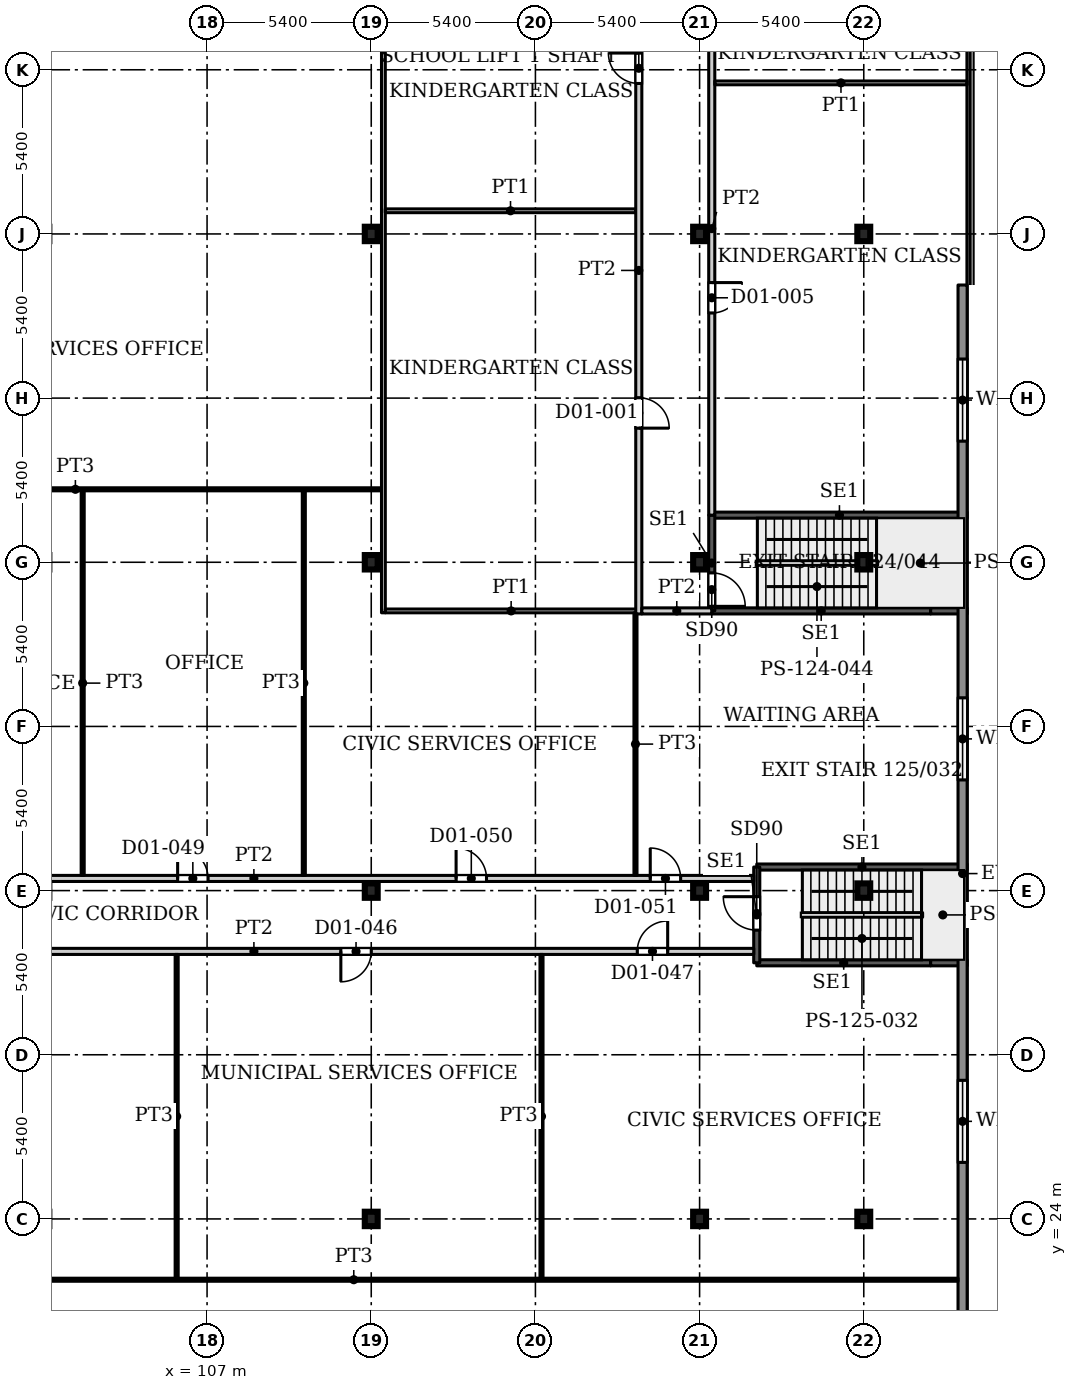
"""IFC4 building model, lengths in metres.
Left out: names, types, materials, properties, quantities, classifications, styles, units other than length and angle.
Written with IfcOpenShell. Run it as: python <this file> out.ifc"""

import sys

from ifc_helpers import new_model, si_unit, direction, frame, frame_2d, origin, origin_2d, place, context, subcontext, project, spatial, rectangle, i_section, extrude, source, transform, mapped, element, fill, save


model = new_model("IFC4")
c1 = context("Model", 3, precision=1e-05, world=origin(), true_north=direction((0.0, 1.0)))
c2 = subcontext(c1, "Body", "Model", "MODEL_VIEW")
j1 = project(units=[si_unit("LENGTHUNIT", "METRE"), si_unit("PLANEANGLEUNIT", "RADIAN")], contexts=[c1])
p1 = place(None, origin())
s1 = spatial("IfcSite", under=j1, at=p1, CompositionType="ELEMENT")
p2 = place(p1, origin())
s2 = spatial("IfcBuilding", under=s1, at=p2, CompositionType="ELEMENT")
p3 = place(p2, frame((0.0, 0.0, 7.5)))
s3 = spatial("IfcBuildingStorey", under=s2, at=p3, CompositionType="ELEMENT", Elevation=7.5)
for number, where, z_axis, x_axis in (
    (1, (112.4, 24.0, 0.0), (0.0, 0.0, 1.0), (1.0, 0.0, 0.0)),
    (2, (123.2, 24.0, 0.0), (0.0, 0.0, 1.0), (1.0, 0.0, 0.0)),
    (3, (128.6, 24.0, 0.0), (0.0, 0.0, 1.0), (1.0, 0.0, 0.0)),
    (4, (112.4, 34.8, 0.0), (0.0, 0.0, 1.0), (1.0, 0.0, 0.0)),
    (5, (123.2, 34.8, 0.0), (0.0, 0.0, 1.0), (1.0, 0.0, 0.0)),
    (6, (128.6, 34.8, 0.0), (0.0, 0.0, 1.0), (1.0, 0.0, 0.0)),
    (7, (112.4, 45.6, 0.0), (0.0, 0.0, 1.0), (1.0, 0.0, 0.0)),
    (8, (123.2, 45.6, 0.0), (0.0, 0.0, 1.0), (1.0, 0.0, 0.0)),
    (9, (128.6, 45.6, 0.0), (0.0, 0.0, 1.0), (1.0, 0.0, 0.0)),
    (10, (112.4, 56.4, 0.0), (0.0, 0.0, 1.0), (1.0, 0.0, 0.0)),
    (11, (123.2, 56.4, 0.0), (0.0, 0.0, 1.0), (1.0, 0.0, 0.0)),
    (12, (128.6, 56.4, 0.0), (0.0, 0.0, 1.0), (1.0, 0.0, 0.0)),
):
    element("IfcColumn", number, at=place(p3, frame(where, z_axis=z_axis, x_axis=x_axis)), inside=s3, PredefinedType="COLUMN", context=c2, shape_type="SweptSolid", body=[
        extrude(i_section(OverallWidth=0.424, OverallDepth=0.474, WebThickness=0.048, FlangeThickness=0.077, FilletRadius=0.014, at=origin_2d()), origin(), (0.0, 0.0, 1.0), 5.0),
    ])
p4 = place(p3, frame((131.85, 54.72, 0.0), z_axis=(0.0, 0.0, 1.0), x_axis=(0.0, -1.0, 0.0)))
e13 = element("IfcWall", 13, at=p4, inside=s3, PredefinedType="SOLIDWALL", context=c2, shape_type="SweptSolid", body=[
    extrude(rectangle(XDim=38.72, YDim=0.3, at=frame_2d((19.36, 0.0))), origin(), (0.0, 0.0, 1.0), 4.75),
])
p5 = place(p4, frame((2.435, 0.0, 0.6)))
e14 = element("IfcOpeningElement", 14, at=p5, cuts=e13, PredefinedType="OPENING", context=c2, shape_type="SweptSolid", body=[
    extrude(rectangle(XDim=2.7, YDim=3.0, at=frame_2d((1.35, 1.5))), frame((0.0, 0.16, 0.0), z_axis=(0.0, -1.0, 0.0), x_axis=(1.0, 0.0, 0.0)), (0.0, 0.0, 1.0), 0.32),
])
p6 = place(p4, frame((13.58, 0.0, 0.6)))
e15 = element("IfcOpeningElement", 15, at=p6, cuts=e13, PredefinedType="OPENING", context=c2, shape_type="SweptSolid", body=[
    extrude(rectangle(XDim=2.7, YDim=3.0, at=frame_2d((1.35, 1.5))), frame((0.0, 0.16, 0.0), z_axis=(0.0, -1.0, 0.0), x_axis=(1.0, 0.0, 0.0)), (0.0, 0.0, 1.0), 0.32),
])
p7 = place(p4, frame((26.16, 0.0, 0.6)))
e16 = element("IfcOpeningElement", 16, at=p7, cuts=e13, PredefinedType="OPENING", context=c2, shape_type="SweptSolid", body=[
    extrude(rectangle(XDim=2.7, YDim=3.0, at=frame_2d((1.35, 1.5))), frame((0.0, 0.16, 0.0), z_axis=(0.0, -1.0, 0.0), x_axis=(1.0, 0.0, 0.0)), (0.0, 0.0, 1.0), 0.32),
])
p8 = place(p3, frame((123.6, 44.0, 0.0), z_axis=(0.0, 0.0, 1.0), x_axis=(1.0, 0.0, 0.0)))
e17 = element("IfcWall", 17, at=p8, inside=s3, PredefinedType="SHEAR", context=c2, shape_type="SweptSolid", body=[
    extrude(rectangle(XDim=7.2, YDim=0.2, at=frame_2d((3.6, 0.0))), origin(), (0.0, 0.0, 1.0), 5.0),
])
p9 = place(p3, frame((130.8, 44.0, 0.0), z_axis=(0.0, 0.0, 1.0), x_axis=(1.0, 0.0, 0.0)))
e18 = element("IfcWall", 18, at=p9, inside=s3, PredefinedType="SHEAR", context=c2, shape_type="SweptSolid", body=[
    extrude(rectangle(XDim=1.2, YDim=0.2, at=frame_2d((0.6, 0.0))), origin(), (0.0, 0.0, 1.0), 5.0),
])
p10 = place(p3, frame((123.6, 47.15, 0.0), z_axis=(0.0, 0.0, 1.0), x_axis=(1.0, 0.0, 0.0)))
e19 = element("IfcWall", 19, at=p10, inside=s3, PredefinedType="SHEAR", context=c2, shape_type="SweptSolid", body=[
    extrude(rectangle(XDim=8.4, YDim=0.2, at=frame_2d((4.2, 0.0))), origin(), (0.0, 0.0, 1.0), 5.0),
])
p11 = place(p3, frame((123.6, 44.0, 0.0), z_axis=(0.0, 0.0, 1.0), x_axis=(0.0, 1.0, 0.0)))
e20 = element("IfcWall", 20, at=p11, inside=s3, PredefinedType="SHEAR", context=c2, shape_type="SweptSolid", body=[
    extrude(rectangle(XDim=3.15, YDim=0.2, at=frame_2d((1.575, 0.0))), origin(), (0.0, 0.0, 1.0), 5.0),
])
p12 = place(p11, frame((0.15, 0.0, 0.0)))
e21 = element("IfcOpeningElement", 21, at=p12, cuts=e20, PredefinedType="OPENING", context=c2, shape_type="SweptSolid", body=[
    extrude(rectangle(XDim=1.1, YDim=2.2, at=frame_2d((0.55, 1.1))), frame((0.0, 0.11, 0.0), z_axis=(0.0, -1.0, 0.0), x_axis=(1.0, 0.0, 0.0)), (0.0, 0.0, 1.0), 0.22),
])
p13 = place(p3, frame((125.08, 32.425, 0.0), z_axis=(0.0, 0.0, 1.0), x_axis=(1.0, 0.0, 0.0)))
e22 = element("IfcWall", 22, at=p13, inside=s3, PredefinedType="SHEAR", context=c2, shape_type="SweptSolid", body=[
    extrude(rectangle(XDim=5.72, YDim=0.2, at=frame_2d((2.86, 0.0))), origin(), (0.0, 0.0, 1.0), 5.0),
])
p14 = place(p3, frame((130.8, 32.425, 0.0), z_axis=(0.0, 0.0, 1.0), x_axis=(1.0, 0.0, 0.0)))
e23 = element("IfcWall", 23, at=p14, inside=s3, PredefinedType="SHEAR", context=c2, shape_type="SweptSolid", body=[
    extrude(rectangle(XDim=1.2, YDim=0.2, at=frame_2d((0.6, 0.0))), origin(), (0.0, 0.0, 1.0), 5.0),
])
p15 = place(p3, frame((125.08, 35.575, 0.0), z_axis=(0.0, 0.0, 1.0), x_axis=(1.0, 0.0, 0.0)))
e24 = element("IfcWall", 24, at=p15, inside=s3, PredefinedType="SHEAR", context=c2, shape_type="SweptSolid", body=[
    extrude(rectangle(XDim=6.92, YDim=0.2, at=frame_2d((3.46, 0.0))), origin(), (0.0, 0.0, 1.0), 5.0),
])
p16 = place(p3, frame((125.08, 32.425, 0.0), z_axis=(0.0, 0.0, 1.0), x_axis=(0.0, 1.0, 0.0)))
e25 = element("IfcWall", 25, at=p16, inside=s3, PredefinedType="SHEAR", context=c2, shape_type="SweptSolid", body=[
    extrude(rectangle(XDim=3.15, YDim=0.2, at=frame_2d((1.575, 0.0))), origin(), (0.0, 0.0, 1.0), 5.0),
])
p17 = place(p16, frame((1.075, 0.0, 0.0)))
e26 = element("IfcOpeningElement", 26, at=p17, cuts=e25, PredefinedType="OPENING", context=c2, shape_type="SweptSolid", body=[
    extrude(rectangle(XDim=1.1, YDim=2.2, at=frame_2d((0.55, 1.1))), frame((0.0, 0.11, 0.0), z_axis=(0.0, -1.0, 0.0), x_axis=(1.0, 0.0, 0.0)), (0.0, 0.0, 1.0), 0.22),
])
p18 = place(p3, frame((91.95, 22.0, 0.0), z_axis=(0.0, 0.0, 1.0), x_axis=(1.0, 0.0, 0.0)))
e27 = element("IfcWall", 27, at=p18, inside=s3, PredefinedType="PARTITIONING", context=c2, shape_type="SweptSolid", body=[
    extrude(rectangle(XDim=39.751, YDim=0.1, at=frame_2d((19.875, 0.0))), origin(), (0.0, 0.0, 1.0), 4.68),
])
p19 = place(p3, frame((92.1, 32.8, 0.0), z_axis=(0.0, 0.0, 1.0), x_axis=(1.0, 0.0, 0.0)))
e28 = element("IfcWall", 28, at=p19, inside=s3, PredefinedType="PARTITIONING", context=c2, shape_type="SweptSolid", body=[
    extrude(rectangle(XDim=32.881, YDim=0.2, at=frame_2d((16.44, 0.0))), origin(), (0.0, 0.0, 1.0), 4.68),
])
p20 = place(p19, frame((6.3, 0.0, 0.0)))
e29 = element("IfcOpeningElement", 29, at=p20, cuts=e28, PredefinedType="OPENING", context=c2, shape_type="SweptSolid", body=[
    extrude(rectangle(XDim=1.0, YDim=2.1, at=frame_2d((0.5, 1.05))), frame((0.0, 0.11, 0.0), z_axis=(0.0, -1.0, 0.0), x_axis=(1.0, 0.0, 0.0)), (0.0, 0.0, 1.0), 0.22),
])
p21 = place(p19, frame((19.3, 0.0, 0.0)))
e30 = element("IfcOpeningElement", 30, at=p21, cuts=e28, PredefinedType="OPENING", context=c2, shape_type="SweptSolid", body=[
    extrude(rectangle(XDim=1.0, YDim=2.1, at=frame_2d((0.5, 1.05))), frame((0.0, 0.11, 0.0), z_axis=(0.0, -1.0, 0.0), x_axis=(1.0, 0.0, 0.0)), (0.0, 0.0, 1.0), 0.22),
])
p22 = place(p19, frame((29.05, 0.0, 0.0)))
e31 = element("IfcOpeningElement", 31, at=p22, cuts=e28, PredefinedType="OPENING", context=c2, shape_type="SweptSolid", body=[
    extrude(rectangle(XDim=1.0, YDim=2.1, at=frame_2d((0.5, 1.05))), frame((0.0, 0.11, 0.0), z_axis=(0.0, -1.0, 0.0), x_axis=(1.0, 0.0, 0.0)), (0.0, 0.0, 1.0), 0.22),
])
p23 = place(p3, frame((92.1, 35.2, 0.0), z_axis=(0.0, 0.0, 1.0), x_axis=(1.0, 0.0, 0.0)))
e32 = element("IfcWall", 32, at=p23, inside=s3, PredefinedType="PARTITIONING", context=c2, shape_type="SweptSolid", body=[
    extrude(rectangle(XDim=32.88, YDim=0.2, at=frame_2d((16.44, 0.0))), origin(), (0.0, 0.0, 1.0), 4.68),
])
p24 = place(p23, frame((4.909, 0.0, 0.0)))
e33 = element("IfcOpeningElement", 33, at=p24, cuts=e32, PredefinedType="OPENING", context=c2, shape_type="SweptSolid", body=[
    extrude(rectangle(XDim=1.0, YDim=2.1, at=frame_2d((0.5, 1.05))), frame((0.0, 0.11, 0.0), z_axis=(0.0, -1.0, 0.0), x_axis=(1.0, 0.0, 0.0)), (0.0, 0.0, 1.0), 0.22),
])
p25 = place(p23, frame((13.932, 0.0, 0.0)))
e34 = element("IfcOpeningElement", 34, at=p25, cuts=e32, PredefinedType="OPENING", context=c2, shape_type="SweptSolid", body=[
    extrude(rectangle(XDim=1.0, YDim=2.1, at=frame_2d((0.5, 1.05))), frame((0.0, 0.11, 0.0), z_axis=(0.0, -1.0, 0.0), x_axis=(1.0, 0.0, 0.0)), (0.0, 0.0, 1.0), 0.22),
])
p26 = place(p23, frame((23.091, 0.0, 0.0)))
e35 = element("IfcOpeningElement", 35, at=p26, cuts=e32, PredefinedType="OPENING", context=c2, shape_type="SweptSolid", body=[
    extrude(rectangle(XDim=1.0, YDim=2.1, at=frame_2d((0.5, 1.05))), frame((0.0, 0.11, 0.0), z_axis=(0.0, -1.0, 0.0), x_axis=(1.0, 0.0, 0.0)), (0.0, 0.0, 1.0), 0.22),
])
p27 = place(p23, frame((29.477, 0.0, 0.0)))
e36 = element("IfcOpeningElement", 36, at=p27, cuts=e32, PredefinedType="OPENING", context=c2, shape_type="SweptSolid", body=[
    extrude(rectangle(XDim=1.0, YDim=2.1, at=frame_2d((0.5, 1.05))), frame((0.0, 0.11, 0.0), z_axis=(0.0, -1.0, 0.0), x_axis=(1.0, 0.0, 0.0)), (0.0, 0.0, 1.0), 0.22),
])
p28 = place(p3, frame((92.6, 48.0, 0.0), z_axis=(0.0, 0.0, 1.0), x_axis=(1.0, 0.0, 0.0)))
e37 = element("IfcWall", 37, at=p28, inside=s3, PredefinedType="PARTITIONING", context=c2, shape_type="SweptSolid", body=[
    extrude(rectangle(XDim=20.138, YDim=0.1, at=frame_2d((10.069, 0.0))), origin(), (0.0, 0.0, 1.0), 4.68),
])
p29 = place(p3, frame((102.909, 35.3, 0.0), z_axis=(0.0, 0.0, 1.0), x_axis=(0.0, 1.0, 0.0)))
e38 = element("IfcWall", 38, at=p29, inside=s3, PredefinedType="PARTITIONING", context=c2, shape_type="SweptSolid", body=[
    extrude(rectangle(XDim=12.65, YDim=0.1, at=frame_2d((6.325, 0.0))), origin(), (0.0, 0.0, 1.0), 4.68),
])
p30 = place(p3, frame((106.0, 22.05, 0.0), z_axis=(0.0, 0.0, 1.0), x_axis=(0.0, 1.0, 0.0)))
e39 = element("IfcWall", 39, at=p30, inside=s3, PredefinedType="PARTITIONING", context=c2, shape_type="SweptSolid", body=[
    extrude(rectangle(XDim=10.65, YDim=0.1, at=frame_2d((5.325, 0.0))), origin(), (0.0, 0.0, 1.0), 4.68),
])
p31 = place(p3, frame((110.182, 35.3, 0.0), z_axis=(0.0, 0.0, 1.0), x_axis=(0.0, 1.0, 0.0)))
e40 = element("IfcWall", 40, at=p31, inside=s3, PredefinedType="PARTITIONING", context=c2, shape_type="SweptSolid", body=[
    extrude(rectangle(XDim=12.65, YDim=0.1, at=frame_2d((6.325, 0.0))), origin(), (0.0, 0.0, 1.0), 4.68),
])
p32 = place(p3, frame((112.8, 43.938, 0.0), z_axis=(0.0, 0.0, 1.0), x_axis=(0.0, 1.0, 0.0)))
e41 = element("IfcWall", 41, at=p32, inside=s3, PredefinedType="PARTITIONING", context=c2, shape_type="SweptSolid", body=[
    extrude(rectangle(XDim=46.787, YDim=0.125, at=frame_2d((23.394, 0.0))), origin(), (0.0, 0.0, 1.0), 4.68),
])
p33 = place(p3, frame((112.862, 44.0, 0.0), z_axis=(0.0, 0.0, 1.0), x_axis=(1.0, 0.0, 0.0)))
e42 = element("IfcWall", 42, at=p33, inside=s3, PredefinedType="PARTITIONING", context=c2, shape_type="SweptSolid", body=[
    extrude(rectangle(XDim=8.279, YDim=0.125, at=frame_2d((4.14, 0.0))), origin(), (0.0, 0.0, 1.0), 4.68),
])
p34 = place(p3, frame((112.862, 57.162, 0.0), z_axis=(0.0, 0.0, 1.0), x_axis=(1.0, 0.0, 0.0)))
e43 = element("IfcWall", 43, at=p34, inside=s3, PredefinedType="PARTITIONING", context=c2, shape_type="SweptSolid", body=[
    extrude(rectangle(XDim=8.238, YDim=0.125, at=frame_2d((4.119, 0.0))), origin(), (0.0, 0.0, 1.0), 4.68),
])
p35 = place(p3, frame((118.0, 22.05, 0.0), z_axis=(0.0, 0.0, 1.0), x_axis=(0.0, 1.0, 0.0)))
e44 = element("IfcWall", 44, at=p35, inside=s3, PredefinedType="PARTITIONING", context=c2, shape_type="SweptSolid", body=[
    extrude(rectangle(XDim=10.65, YDim=0.1, at=frame_2d((5.325, 0.0))), origin(), (0.0, 0.0, 1.0), 4.68),
])
p36 = place(p3, frame((121.091, 35.3, 0.0), z_axis=(0.0, 0.0, 1.0), x_axis=(0.0, 1.0, 0.0)))
e45 = element("IfcWall", 45, at=p36, inside=s3, PredefinedType="PARTITIONING", context=c2, shape_type="SweptSolid", body=[
    extrude(rectangle(XDim=8.638, YDim=0.1, at=frame_2d((4.319, 0.0))), origin(), (0.0, 0.0, 1.0), 4.68),
])
p37 = place(p3, frame((121.2, 43.9, 0.0), z_axis=(0.0, 0.0, 1.0), x_axis=(0.0, 1.0, 0.0)))
e46 = element("IfcWall", 46, at=p37, inside=s3, PredefinedType="PARTITIONING", context=c2, shape_type="SweptSolid", body=[
    extrude(rectangle(XDim=22.6, YDim=0.2, at=frame_2d((11.3, 0.0))), origin(), (0.0, 0.0, 1.0), 4.68),
])
p38 = place(p37, frame((6.112, 0.0, 0.0)))
e47 = element("IfcOpeningElement", 47, at=p38, cuts=e46, PredefinedType="OPENING", context=c2, shape_type="SweptSolid", body=[
    extrude(rectangle(XDim=1.0, YDim=2.1, at=frame_2d((0.5, 1.05))), frame((0.0, 0.11, 0.0), z_axis=(0.0, -1.0, 0.0), x_axis=(1.0, 0.0, 0.0)), (0.0, 0.0, 1.0), 0.22),
])
p39 = place(p37, frame((17.45, 0.0, 0.0)))
e48 = element("IfcOpeningElement", 48, at=p39, cuts=e46, PredefinedType="OPENING", context=c2, shape_type="SweptSolid", body=[
    extrude(rectangle(XDim=1.0, YDim=2.1, at=frame_2d((0.5, 1.05))), frame((0.0, 0.11, 0.0), z_axis=(0.0, -1.0, 0.0), x_axis=(1.0, 0.0, 0.0)), (0.0, 0.0, 1.0), 0.22),
])
p40 = place(p3, frame((121.3, 44.0, 0.0), z_axis=(0.0, 0.0, 1.0), x_axis=(1.0, 0.0, 0.0)))
e49 = element("IfcWall", 49, at=p40, inside=s3, PredefinedType="PARTITIONING", context=c2, shape_type="SweptSolid", body=[
    extrude(rectangle(XDim=2.3, YDim=0.2, at=frame_2d((1.15, 0.0))), origin(), (0.0, 0.0, 1.0), 4.68),
])
p41 = place(p3, frame((123.6, 47.15, 0.0), z_axis=(0.0, 0.0, 1.0), x_axis=(0.0, 1.0, 0.0)))
e50 = element("IfcWall", 50, at=p41, inside=s3, PredefinedType="PARTITIONING", context=c2, shape_type="SweptSolid", body=[
    extrude(rectangle(XDim=18.85, YDim=0.2, at=frame_2d((9.425, 0.0))), origin(), (0.0, 0.0, 1.0), 4.68),
])
p42 = place(p41, frame((6.65, 0.0, 0.0)))
e51 = element("IfcOpeningElement", 51, at=p42, cuts=e50, PredefinedType="OPENING", context=c2, shape_type="SweptSolid", body=[
    extrude(rectangle(XDim=1.0, YDim=2.1, at=frame_2d((0.5, 1.05))), frame((0.0, 0.11, 0.0), z_axis=(0.0, -1.0, 0.0), x_axis=(1.0, 0.0, 0.0)), (0.0, 0.0, 1.0), 0.22),
])
p43 = place(p41, frame((16.119, 0.0, 0.0)))
e52 = element("IfcOpeningElement", 52, at=p43, cuts=e50, PredefinedType="OPENING", context=c2, shape_type="SweptSolid", body=[
    extrude(rectangle(XDim=1.0, YDim=2.1, at=frame_2d((0.5, 1.05))), frame((0.0, 0.11, 0.0), z_axis=(0.0, -1.0, 0.0), x_axis=(1.0, 0.0, 0.0)), (0.0, 0.0, 1.0), 0.22),
])
p44 = place(p3, frame((123.7, 61.369, 0.0), z_axis=(0.0, 0.0, 1.0), x_axis=(1.0, 0.0, 0.0)))
e53 = element("IfcWall", 53, at=p44, inside=s3, PredefinedType="PARTITIONING", context=c2, shape_type="SweptSolid", body=[
    extrude(rectangle(XDim=8.3, YDim=0.125, at=frame_2d((4.15, 0.0))), origin(), (0.0, 0.0, 1.0), 4.68),
])
m1 = source(origin(), c2, "Body", "SweptSolid", [
    extrude(rectangle(XDim=2.7, YDim=3.0, at=frame_2d((1.35, 1.5))), frame((0.0, 0.03, 0.0), z_axis=(0.0, -1.0, 0.0), x_axis=(1.0, 0.0, 0.0)), (0.0, 0.0, 1.0), 0.06),
])
p45 = place(p5, origin())
e54 = element("IfcWindow", 54, at=p45, inside=s3, PartitioningType="SINGLE_PANEL", PredefinedType="WINDOW", context=c2, shape_type="MappedRepresentation", body=[
    mapped(m1, transform((0.0, 0.0, 0.0), x_axis=(1.0, 0.0, 0.0), y_axis=(0.0, 1.0, 0.0), z_axis=(0.0, 0.0, 1.0), scale=1.0)),
])
fill(e14, e54)
p46 = place(p6, origin())
e55 = element("IfcWindow", 55, at=p46, inside=s3, PartitioningType="SINGLE_PANEL", PredefinedType="WINDOW", context=c2, shape_type="MappedRepresentation", body=[
    mapped(m1, transform((0.0, 0.0, 0.0), x_axis=(1.0, 0.0, 0.0), y_axis=(0.0, 1.0, 0.0), z_axis=(0.0, 0.0, 1.0), scale=1.0)),
])
fill(e15, e55)
p47 = place(p7, origin())
e56 = element("IfcWindow", 56, at=p47, inside=s3, PartitioningType="SINGLE_PANEL", PredefinedType="WINDOW", context=c2, shape_type="MappedRepresentation", body=[
    mapped(m1, transform((0.0, 0.0, 0.0), x_axis=(1.0, 0.0, 0.0), y_axis=(0.0, 1.0, 0.0), z_axis=(0.0, 0.0, 1.0), scale=1.0)),
])
fill(e16, e56)
m2 = source(origin(), c2, "Body", "SweptSolid", [
    extrude(rectangle(XDim=1.1, YDim=2.2, at=frame_2d((0.55, 1.1))), frame((0.0, 0.025, 0.0), z_axis=(0.0, -1.0, 0.0), x_axis=(1.0, 0.0, 0.0)), (0.0, 0.0, 1.0), 0.05),
])
p48 = place(p12, origin())
e57 = element("IfcDoor", 57, at=p48, inside=s3, OperationType="SINGLE_SWING_RIGHT", PredefinedType="DOOR", context=c2, shape_type="MappedRepresentation", body=[
    mapped(m2, transform((0.0, 0.0, 0.0), x_axis=(1.0, 0.0, 0.0), y_axis=(0.0, 1.0, 0.0), z_axis=(0.0, 0.0, 1.0), scale=1.0)),
])
fill(e21, e57)
p49 = place(p17, origin())
e58 = element("IfcDoor", 58, at=p49, inside=s3, OperationType="SINGLE_SWING_LEFT", PredefinedType="DOOR", context=c2, shape_type="MappedRepresentation", body=[
    mapped(m2, transform((0.0, 0.0, 0.0), x_axis=(1.0, 0.0, 0.0), y_axis=(0.0, 1.0, 0.0), z_axis=(0.0, 0.0, 1.0), scale=1.0)),
])
fill(e26, e58)
m3 = source(origin(), c2, "Body", "SweptSolid", [
    extrude(rectangle(XDim=1.0, YDim=2.1, at=frame_2d((0.5, 1.05))), frame((0.0, 0.025, 0.0), z_axis=(0.0, -1.0, 0.0), x_axis=(1.0, 0.0, 0.0)), (0.0, 0.0, 1.0), 0.05),
])
p50 = place(p38, origin())
e59 = element("IfcDoor", 59, at=p50, inside=s3, OperationType="SINGLE_SWING_RIGHT", PredefinedType="DOOR", context=c2, shape_type="MappedRepresentation", body=[
    mapped(m3, transform((0.0, 0.0, 0.0), x_axis=(1.0, 0.0, 0.0), y_axis=(0.0, 1.0, 0.0), z_axis=(0.0, 0.0, 1.0), scale=1.0)),
])
fill(e47, e59)
p51 = place(p39, origin())
e60 = element("IfcDoor", 60, at=p51, inside=s3, OperationType="SINGLE_SWING_LEFT", PredefinedType="DOOR", context=c2, shape_type="MappedRepresentation", body=[
    mapped(m3, transform((0.0, 0.0, 0.0), x_axis=(1.0, 0.0, 0.0), y_axis=(0.0, 1.0, 0.0), z_axis=(0.0, 0.0, 1.0), scale=1.0)),
])
fill(e48, e60)
p52 = place(p42, origin())
e61 = element("IfcDoor", 61, at=p52, inside=s3, OperationType="SINGLE_SWING_RIGHT", PredefinedType="DOOR", context=c2, shape_type="MappedRepresentation", body=[
    mapped(m3, transform((0.0, 0.0, 0.0), x_axis=(1.0, 0.0, 0.0), y_axis=(0.0, 1.0, 0.0), z_axis=(0.0, 0.0, 1.0), scale=1.0)),
])
fill(e51, e61)
p53 = place(p21, origin())
e62 = element("IfcDoor", 62, at=p53, inside=s3, OperationType="SINGLE_SWING_RIGHT", PredefinedType="DOOR", context=c2, shape_type="MappedRepresentation", body=[
    mapped(m3, transform((0.0, 0.0, 0.0), x_axis=(1.0, 0.0, 0.0), y_axis=(0.0, 1.0, 0.0), z_axis=(0.0, 0.0, 1.0), scale=1.0)),
])
fill(e30, e62)
p54 = place(p22, origin())
e63 = element("IfcDoor", 63, at=p54, inside=s3, OperationType="SINGLE_SWING_LEFT", PredefinedType="DOOR", context=c2, shape_type="MappedRepresentation", body=[
    mapped(m3, transform((0.0, 0.0, 0.0), x_axis=(1.0, 0.0, 0.0), y_axis=(0.0, 1.0, 0.0), z_axis=(0.0, 0.0, 1.0), scale=1.0)),
])
fill(e31, e63)
p55 = place(p25, origin())
e64 = element("IfcDoor", 64, at=p55, inside=s3, OperationType="SINGLE_SWING_LEFT", PredefinedType="DOOR", context=c2, shape_type="MappedRepresentation", body=[
    mapped(m3, transform((0.0, 0.0, 0.0), x_axis=(1.0, 0.0, 0.0), y_axis=(0.0, 1.0, 0.0), z_axis=(0.0, 0.0, 1.0), scale=1.0)),
])
fill(e34, e64)
p56 = place(p26, origin())
e65 = element("IfcDoor", 65, at=p56, inside=s3, OperationType="SINGLE_SWING_LEFT", PredefinedType="DOOR", context=c2, shape_type="MappedRepresentation", body=[
    mapped(m3, transform((0.0, 0.0, 0.0), x_axis=(1.0, 0.0, 0.0), y_axis=(0.0, 1.0, 0.0), z_axis=(0.0, 0.0, 1.0), scale=1.0)),
])
fill(e35, e65)
p57 = place(p27, origin())
e66 = element("IfcDoor", 66, at=p57, inside=s3, OperationType="SINGLE_SWING_LEFT", PredefinedType="DOOR", context=c2, shape_type="MappedRepresentation", body=[
    mapped(m3, transform((0.0, 0.0, 0.0), x_axis=(1.0, 0.0, 0.0), y_axis=(0.0, 1.0, 0.0), z_axis=(0.0, 0.0, 1.0), scale=1.0)),
])
fill(e36, e66)
save(model, sys.argv[1])
